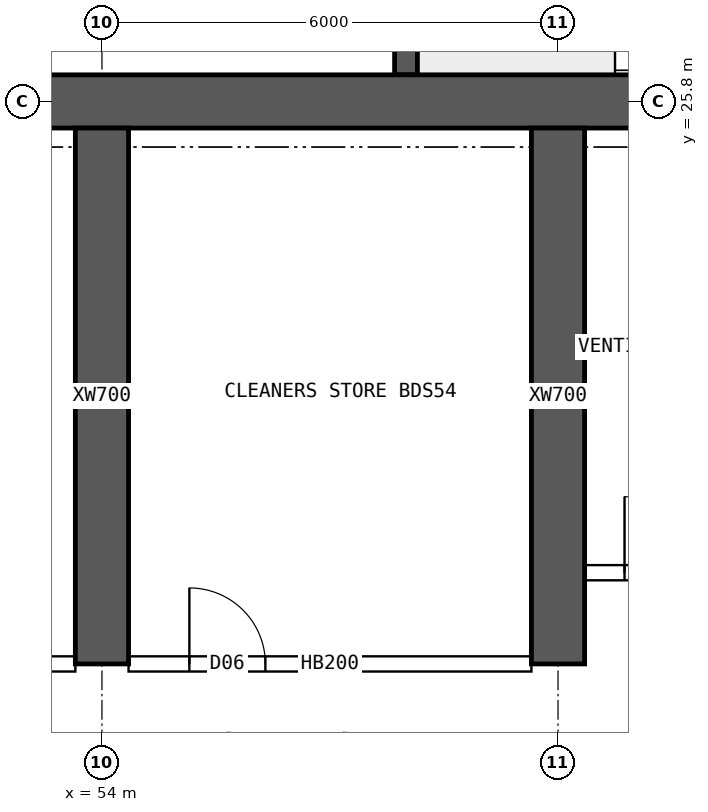
"""IFC4 building model, lengths in metres.
Left out: names, types, materials, properties, quantities, classifications, styles, units other than length and angle.
Written with IfcOpenShell. Run it as: python <this file> out.ifc"""

import sys

from ifc_helpers import new_model, si_unit, direction, frame, frame_2d, origin, place, context, subcontext, project, spatial, rectangle, extrude, element, fill, save


model = new_model("IFC4")
c1 = context("Model", 3, precision=1e-05, world=origin(), true_north=direction((0.0, 1.0)))
c2 = subcontext(c1, "Body", "Model", "MODEL_VIEW")
j1 = project(units=[si_unit("LENGTHUNIT", "METRE"), si_unit("PLANEANGLEUNIT", "RADIAN")], contexts=[c1])
p1 = place(None, origin())
s1 = spatial("IfcSite", under=j1, at=p1, CompositionType="ELEMENT")
p2 = place(p1, origin())
s2 = spatial("IfcBuilding", under=s1, at=p2, CompositionType="ELEMENT")
p3 = place(p2, frame((0.0, 0.0, 235.3)))
s3 = spatial("IfcBuildingStorey", under=s2, at=p3, CompositionType="ELEMENT", Elevation=235.3)
p4 = place(p3, frame((18.0, 25.8, 0.0), z_axis=(0.0, 0.0, 1.0), x_axis=(1.0, 0.0, 0.0)))
e1 = element("IfcWall", 1, at=p4, inside=s3, PredefinedType="SHEAR", context=c2, shape_type="SweptSolid", body=[
    extrude(rectangle(XDim=48.0, YDim=0.7, at=frame_2d((24.0, 0.0))), origin(), (0.0, 0.0, 1.0), 3.75),
])
p5 = place(p3, frame((58.0, 26.15, 0.0), z_axis=(0.0, 0.0, 1.0), x_axis=(0.0, 1.0, 0.0)))
e2 = element("IfcWall", 2, at=p5, inside=s3, PredefinedType="SHEAR", context=c2, shape_type="SweptSolid", body=[
    extrude(rectangle(XDim=4.1, YDim=0.3, at=frame_2d((2.05, 0.0))), origin(), (0.0, 0.0, 1.0), 3.75),
])
for number, where, z_axis, x_axis in (
    (3, (54.0, 18.4, 0.0), (0.0, 0.0, 1.0), (0.0, 1.0, 0.0)),
    (4, (60.0, 18.4, 0.0), (0.0, 0.0, 1.0), (0.0, 1.0, 0.0)),
):
    element("IfcWall", number, at=place(p3, frame(where, z_axis=z_axis, x_axis=x_axis)), inside=s3, PredefinedType="SHEAR", context=c2, shape_type="SweptSolid", body=[
        extrude(rectangle(XDim=7.05, YDim=0.7, at=frame_2d((3.525, 0.0))), origin(), (0.0, 0.0, 1.0), 3.75),
    ])
p6 = place(p3, frame((48.35, 18.4, 0.0), z_axis=(0.0, 0.0, 1.0), x_axis=(1.0, 0.0, 0.0)))
e5 = element("IfcWall", 5, at=p6, inside=s3, PredefinedType="SOLIDWALL", context=c2, shape_type="SweptSolid", body=[
    extrude(rectangle(XDim=5.3, YDim=0.2, at=frame_2d((2.65, 0.0))), origin(), (0.0, 0.0, 1.0), 3.5),
])
p7 = place(p6, frame((0.15, 0.0, 0.0)))
e6 = element("IfcOpeningElement", 6, at=p7, cuts=e5, PredefinedType="OPENING", context=c2, shape_type="SweptSolid", body=[
    extrude(rectangle(XDim=0.9, YDim=2.1, at=frame_2d((0.45, 1.05))), frame((0.0, 0.11, 0.0), z_axis=(0.0, -1.0, 0.0), x_axis=(1.0, 0.0, 0.0)), (0.0, 0.0, 1.0), 0.22),
])
p8 = place(p6, frame((2.17, 0.0, 0.0)))
e7 = element("IfcOpeningElement", 7, at=p8, cuts=e5, PredefinedType="OPENING", context=c2, shape_type="SweptSolid", body=[
    extrude(rectangle(XDim=0.9, YDim=2.1, at=frame_2d((0.45, 1.05))), frame((0.0, 0.11, 0.0), z_axis=(0.0, -1.0, 0.0), x_axis=(1.0, 0.0, 0.0)), (0.0, 0.0, 1.0), 0.22),
])
p9 = place(p3, frame((54.35, 18.4, 0.0), z_axis=(0.0, 0.0, 1.0), x_axis=(1.0, 0.0, 0.0)))
e8 = element("IfcWall", 8, at=p9, inside=s3, PredefinedType="SOLIDWALL", context=c2, shape_type="SweptSolid", body=[
    extrude(rectangle(XDim=5.3, YDim=0.2, at=frame_2d((2.65, 0.0))), origin(), (0.0, 0.0, 1.0), 3.5),
])
p10 = place(p9, frame((0.8, 0.0, 0.0)))
e9 = element("IfcOpeningElement", 9, at=p10, cuts=e8, PredefinedType="OPENING", context=c2, shape_type="SweptSolid", body=[
    extrude(rectangle(XDim=1.0, YDim=2.1, at=frame_2d((0.5, 1.05))), frame((0.0, 0.11, 0.0), z_axis=(0.0, -1.0, 0.0), x_axis=(1.0, 0.0, 0.0)), (0.0, 0.0, 1.0), 0.22),
])
p11 = place(p3, frame((60.35, 19.6, 0.0), z_axis=(0.0, 0.0, 1.0), x_axis=(1.0, 0.0, 0.0)))
e10 = element("IfcWall", 10, at=p11, inside=s3, PredefinedType="SOLIDWALL", context=c2, shape_type="SweptSolid", body=[
    extrude(rectangle(XDim=5.3, YDim=0.2, at=frame_2d((2.65, 0.0))), origin(), (0.0, 0.0, 1.0), 3.5),
])
p12 = place(p11, frame((0.525, 0.0, 0.0)))
e11 = element("IfcOpeningElement", 11, at=p12, cuts=e10, PredefinedType="OPENING", context=c2, shape_type="SweptSolid", body=[
    extrude(rectangle(XDim=1.0, YDim=2.1, at=frame_2d((0.5, 1.05))), frame((0.0, 0.11, 0.0), z_axis=(0.0, -1.0, 0.0), x_axis=(1.0, 0.0, 0.0)), (0.0, 0.0, 1.0), 0.22),
])
p13 = place(p10, origin())
e12 = element("IfcDoor", 12, at=p13, inside=s3, OperationType="SINGLE_SWING_LEFT", PredefinedType="DOOR", context=c2, shape_type="SweptSolid", body=[
    extrude(rectangle(XDim=1.0, YDim=2.1, at=frame_2d((0.5, 1.05))), frame((0.0, 0.025, 0.0), z_axis=(0.0, -1.0, 0.0), x_axis=(1.0, 0.0, 0.0)), (0.0, 0.0, 1.0), 0.05),
])
fill(e9, e12)
p14 = place(p12, origin())
e13 = element("IfcDoor", 13, at=p14, inside=s3, OperationType="SINGLE_SWING_LEFT", PredefinedType="DOOR", context=c2, shape_type="SweptSolid", body=[
    extrude(rectangle(XDim=1.0, YDim=2.1, at=frame_2d((0.5, 1.05))), frame((0.0, 0.025, 0.0), z_axis=(0.0, -1.0, 0.0), x_axis=(1.0, 0.0, 0.0)), (0.0, 0.0, 1.0), 0.05),
])
fill(e11, e13)
save(model, sys.argv[1])
